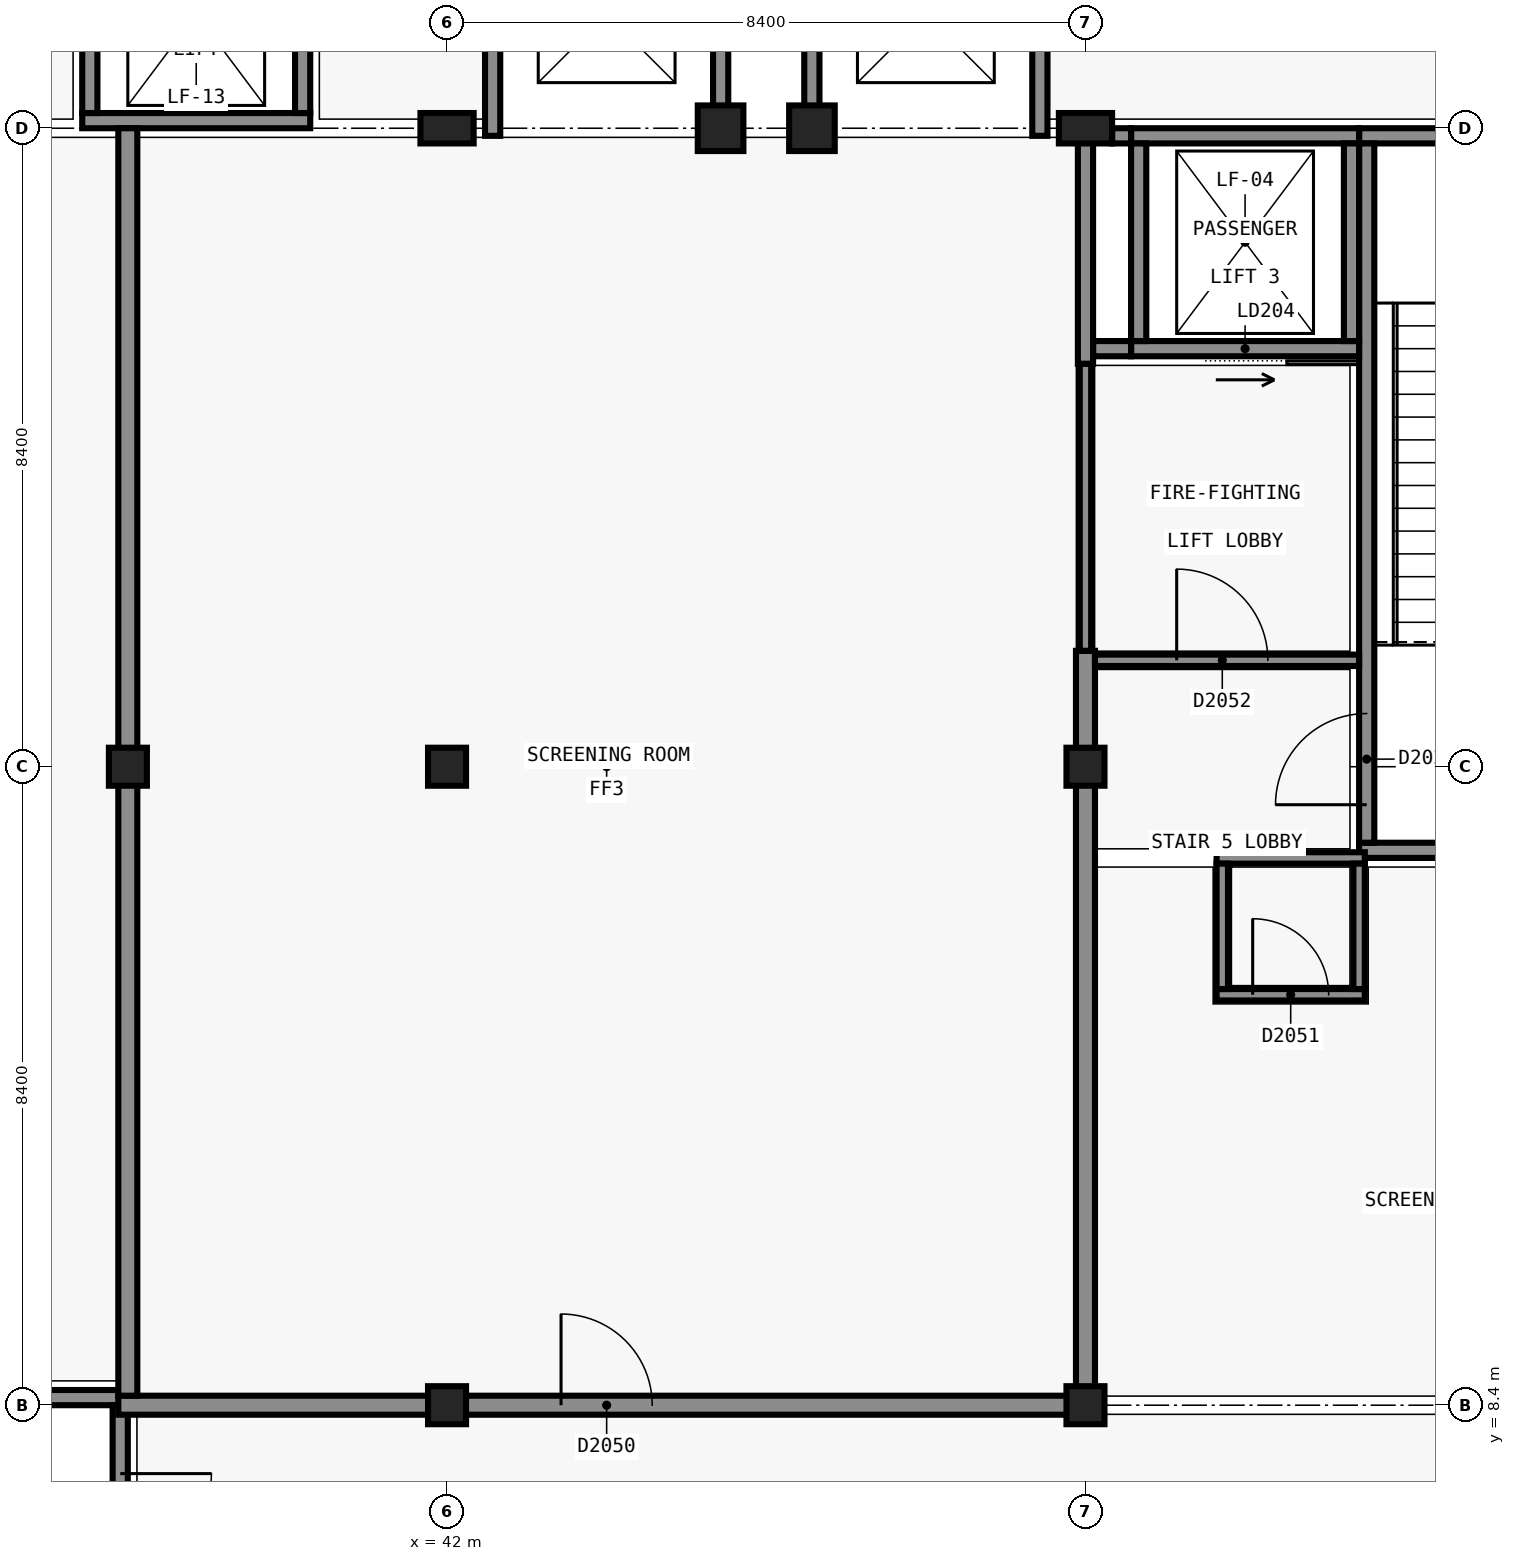
"""IFC4 building model, lengths in metres.
Left out: names, types, materials, properties, quantities, classifications, styles, units other than length and angle.
Written with IfcOpenShell. Run it as: python <this file> out.ifc"""

import sys

from ifc_helpers import new_model, si_unit, direction, frame, frame_2d, origin, origin_2d, place, context, subcontext, project, spatial, rectangle, extrude, element, fill, save


model = new_model("IFC4")
c1 = context("Model", 3, precision=1e-05, world=origin(), true_north=direction((0.0, 1.0)))
c2 = subcontext(c1, "Body", "Model", "MODEL_VIEW")
j1 = project(units=[si_unit("LENGTHUNIT", "METRE"), si_unit("PLANEANGLEUNIT", "RADIAN")], contexts=[c1])
p1 = place(None, origin())
s1 = spatial("IfcSite", under=j1, at=p1, CompositionType="ELEMENT")
p2 = place(p1, origin())
s2 = spatial("IfcBuilding", under=s1, at=p2, CompositionType="ELEMENT")
p3 = place(p2, frame((0.0, 0.0, 10.2)))
s3 = spatial("IfcBuildingStorey", under=s2, at=p3, CompositionType="ELEMENT", Elevation=10.2)
p4 = place(p3, frame((33.9, 8.5, 0.0), z_axis=(0.0, 0.0, 1.0), x_axis=(1.0, 0.0, 0.0)))
e1 = element("IfcWall", 1, at=p4, inside=s3, PredefinedType="SHEAR", context=c2, shape_type="SweptSolid", body=[
    extrude(rectangle(XDim=3.9, YDim=0.2, at=frame_2d((1.95, 0.0))), origin(), (0.0, 0.0, 1.0), 4.8),
])
p5 = place(p4, frame((1.2, 0.0, 0.0)))
e2 = element("IfcOpeningElement", 2, at=p5, cuts=e1, PredefinedType="OPENING", context=c2, shape_type="SweptSolid", body=[
    extrude(rectangle(XDim=1.2, YDim=2.1, at=frame_2d((0.6, 1.05))), frame((0.0, 0.11, 0.0), z_axis=(0.0, -1.0, 0.0), x_axis=(1.0, 0.0, 0.0)), (0.0, 0.0, 1.0), 0.22),
])
p6 = place(p3, frame((37.7, 8.4, 0.0), z_axis=(0.0, 0.0, 1.0), x_axis=(0.0, -1.0, 0.0)))
e3 = element("IfcWall", 3, at=p6, inside=s3, PredefinedType="SHEAR", context=c2, shape_type="SweptSolid", body=[
    extrude(rectangle(XDim=8.2, YDim=0.2, at=frame_2d((4.1, 0.0))), origin(), (0.0, 0.0, 1.0), 4.8),
])
p7 = place(p6, frame((0.9, 0.0, 0.0)))
e4 = element("IfcOpeningElement", 4, at=p7, cuts=e3, PredefinedType="OPENING", context=c2, shape_type="SweptSolid", body=[
    extrude(rectangle(XDim=1.2, YDim=2.1, at=frame_2d((0.6, 1.05))), frame((0.0, 0.11, 0.0), z_axis=(0.0, -1.0, 0.0), x_axis=(1.0, 0.0, 0.0)), (0.0, 0.0, 1.0), 0.22),
])
p8 = place(p3, frame((58.8, 15.7, 0.0), z_axis=(0.0, 0.0, 1.0), x_axis=(-1.0, 0.0, 0.0)))
e5 = element("IfcWall", 5, at=p8, inside=s3, PredefinedType="SHEAR", context=c2, shape_type="SweptSolid", body=[
    extrude(rectangle(XDim=4.8, YDim=0.2, at=frame_2d((2.4, 0.0))), origin(), (0.0, 0.0, 1.0), 4.8),
])
p9 = place(p8, frame((1.9, 0.0, 0.0)))
e6 = element("IfcOpeningElement", 6, at=p9, cuts=e5, PredefinedType="OPENING", context=c2, shape_type="SweptSolid", body=[
    extrude(rectangle(XDim=1.2, YDim=2.1, at=frame_2d((0.6, 1.05))), frame((0.0, 0.11, 0.0), z_axis=(0.0, -1.0, 0.0), x_axis=(1.0, 0.0, 0.0)), (0.0, 0.0, 1.0), 0.22),
])
p10 = place(p3, frame((54.0, 25.1, 0.0), z_axis=(0.0, 0.0, 1.0), x_axis=(1.0, 0.0, 0.0)))
e7 = element("IfcWall", 7, at=p10, inside=s3, PredefinedType="SHEAR", context=c2, shape_type="SweptSolid", body=[
    extrude(rectangle(XDim=4.8, YDim=0.2, at=frame_2d((2.4, 0.0))), origin(), (0.0, 0.0, 1.0), 4.8),
])
p11 = place(p3, frame((54.1, 15.8, 0.0), z_axis=(0.0, 0.0, 1.0), x_axis=(0.0, 1.0, 0.0)))
e8 = element("IfcWall", 8, at=p11, inside=s3, PredefinedType="SHEAR", context=c2, shape_type="SweptSolid", body=[
    extrude(rectangle(XDim=9.2, YDim=0.2, at=frame_2d((4.6, 0.0))), origin(), (0.0, 0.0, 1.0), 4.8),
])
p12 = place(p11, frame((0.5, 0.0, 0.0)))
e9 = element("IfcOpeningElement", 9, at=p12, cuts=e8, PredefinedType="OPENING", context=c2, shape_type="SweptSolid", body=[
    extrude(rectangle(XDim=1.2, YDim=2.1, at=frame_2d((0.6, 1.05))), frame((0.0, 0.11, 0.0), z_axis=(0.0, -1.0, 0.0), x_axis=(1.0, 0.0, 0.0)), (0.0, 0.0, 1.0), 0.22),
])
p13 = place(p3, frame((54.0, 22.3, 0.0), z_axis=(0.0, 0.0, 1.0), x_axis=(-1.0, 0.0, 0.0)))
e10 = element("IfcWall", 10, at=p13, inside=s3, PredefinedType="SHEAR", context=c2, shape_type="SweptSolid", body=[
    extrude(rectangle(XDim=3.0, YDim=0.2, at=frame_2d((1.5, 0.0))), origin(), (0.0, 0.0, 1.0), 4.8),
])
p14 = place(p13, frame((0.95, 0.0, 0.0)))
e11 = element("IfcOpeningElement", 11, at=p14, cuts=e10, PredefinedType="OPENING", context=c2, shape_type="SweptSolid", body=[
    extrude(rectangle(XDim=1.1, YDim=2.1, at=frame_2d((0.55, 1.05))), frame((0.0, 0.11, 0.0), z_axis=(0.0, -1.0, 0.0), x_axis=(1.0, 0.0, 0.0)), (0.0, 0.0, 1.0), 0.22),
])
p15 = place(p3, frame((51.0, 25.1, 0.0), z_axis=(0.0, 0.0, 1.0), x_axis=(1.0, 0.0, 0.0)))
e12 = element("IfcWall", 12, at=p15, inside=s3, PredefinedType="SHEAR", context=c2, shape_type="SweptSolid", body=[
    extrude(rectangle(XDim=3.0, YDim=0.2, at=frame_2d((1.5, 0.0))), origin(), (0.0, 0.0, 1.0), 4.8),
])
for number, where, z_axis, x_axis in (
    (13, (51.1, 22.4, 0.0), (0.0, 0.0, 1.0), (0.0, 1.0, 0.0)),
    (14, (53.9, 25.0, 0.0), (0.0, 0.0, 1.0), (0.0, -1.0, 0.0)),
):
    element("IfcWall", number, at=place(p3, frame(where, z_axis=z_axis, x_axis=x_axis)), inside=s3, PredefinedType="SHEAR", context=c2, shape_type="SweptSolid", body=[
        extrude(rectangle(XDim=2.6, YDim=0.2, at=frame_2d((1.3, 0.0))), origin(), (0.0, 0.0, 1.0), 4.8),
    ])
p16 = place(p3, frame((40.2, 25.3, 0.0), z_axis=(0.0, 0.0, 1.0), x_axis=(-1.0, 0.0, 0.0)))
e15 = element("IfcWall", 15, at=p16, inside=s3, PredefinedType="SHEAR", context=c2, shape_type="SweptSolid", body=[
    extrude(rectangle(XDim=3.0, YDim=0.2, at=frame_2d((1.5, 0.0))), origin(), (0.0, 0.0, 1.0), 4.8),
])
for number, where, z_axis, x_axis in (
    (16, (37.3, 25.4, 0.0), (0.0, 0.0, 1.0), (0.0, 1.0, 0.0)),
    (17, (40.1, 28.0, 0.0), (0.0, 0.0, 1.0), (0.0, -1.0, 0.0)),
):
    element("IfcWall", number, at=place(p3, frame(where, z_axis=z_axis, x_axis=x_axis)), inside=s3, PredefinedType="SHEAR", context=c2, shape_type="SweptSolid", body=[
        extrude(rectangle(XDim=2.6, YDim=0.2, at=frame_2d((1.3, 0.0))), origin(), (0.0, 0.0, 1.0), 4.8),
    ])
for number, where, z_axis, x_axis in (
    (18, (42.0, 8.4, 0.0), (0.0, 0.0, 1.0), (1.0, 0.0, 0.0)),
    (19, (42.0, 16.8, 0.0), (0.0, 0.0, 1.0), (1.0, 0.0, 0.0)),
):
    element("IfcColumn", number, at=place(p3, frame(where, z_axis=z_axis, x_axis=x_axis)), inside=s3, PredefinedType="COLUMN", context=c2, shape_type="SweptSolid", body=[
        extrude(rectangle(XDim=0.5, YDim=0.5, at=origin_2d()), origin(), (0.0, 0.0, 1.0), 4.8),
    ])
p17 = place(p3, frame((42.0, 25.2, 0.0), z_axis=(0.0, 0.0, 1.0), x_axis=(1.0, 0.0, 0.0)))
e20 = element("IfcColumn", 20, at=p17, inside=s3, PredefinedType="COLUMN", context=c2, shape_type="SweptSolid", body=[
    extrude(rectangle(XDim=0.7, YDim=0.4, at=origin_2d()), origin(), (0.0, 0.0, 1.0), 4.8),
])
for number, where, z_axis, x_axis in (
    (21, (50.4, 8.4, 0.0), (0.0, 0.0, 1.0), (1.0, 0.0, 0.0)),
    (22, (50.4, 16.8, 0.0), (0.0, 0.0, 1.0), (1.0, 0.0, 0.0)),
):
    element("IfcColumn", number, at=place(p3, frame(where, z_axis=z_axis, x_axis=x_axis)), inside=s3, PredefinedType="COLUMN", context=c2, shape_type="SweptSolid", body=[
        extrude(rectangle(XDim=0.5, YDim=0.5, at=origin_2d()), origin(), (0.0, 0.0, 1.0), 4.8),
    ])
p18 = place(p3, frame((50.4, 25.2, 0.0), z_axis=(0.0, 0.0, 1.0), x_axis=(1.0, 0.0, 0.0)))
e23 = element("IfcColumn", 23, at=p18, inside=s3, PredefinedType="COLUMN", context=c2, shape_type="SweptSolid", body=[
    extrude(rectangle(XDim=0.7, YDim=0.4, at=origin_2d()), origin(), (0.0, 0.0, 1.0), 4.8),
])
p19 = place(p3, frame((51.0, 22.3, 0.0), z_axis=(0.0, 0.0, 1.0), x_axis=(-1.0, 0.0, 0.0)))
e24 = element("IfcWall", 24, at=p19, inside=s3, PredefinedType="SHEAR", context=c2, shape_type="SweptSolid", body=[
    extrude(rectangle(XDim=0.5, YDim=0.2, at=frame_2d((0.25, 0.0))), origin(), (0.0, 0.0, 1.0), 4.8),
])
p20 = place(p3, frame((50.75, 25.1, 0.0), z_axis=(0.0, 0.0, 1.0), x_axis=(1.0, 0.0, 0.0)))
e25 = element("IfcWall", 25, at=p20, inside=s3, PredefinedType="SHEAR", context=c2, shape_type="SweptSolid", body=[
    extrude(rectangle(XDim=0.25, YDim=0.2, at=frame_2d((0.125, 0.0))), origin(), (0.0, 0.0, 1.0), 4.8),
])
for number, where, z_axis, x_axis in (
    (26, (45.599, 25.2, 0.0), (0.0, 0.0, 1.0), (1.0, 0.0, 0.0)),
    (27, (46.801, 25.2, 0.0), (0.0, 0.0, 1.0), (1.0, 0.0, 0.0)),
):
    element("IfcColumn", number, at=place(p3, frame(where, z_axis=z_axis, x_axis=x_axis)), inside=s3, PredefinedType="COLUMN", context=c2, shape_type="SweptSolid", body=[
        extrude(rectangle(XDim=0.6, YDim=0.6, at=origin_2d()), origin(), (0.0, 0.0, 1.0), 4.8),
    ])
p21 = place(p3, frame((37.801, 16.8, 0.0), z_axis=(0.0, 0.0, 1.0), x_axis=(1.0, 0.0, 0.0)))
e28 = element("IfcColumn", 28, at=p21, inside=s3, PredefinedType="COLUMN", context=c2, shape_type="SweptSolid", body=[
    extrude(rectangle(XDim=0.5, YDim=0.5, at=origin_2d()), origin(), (0.0, 0.0, 1.0), 4.8),
])
p22 = place(p3, frame((37.675, 8.4, 0.0), z_axis=(0.0, 0.0, 1.0), x_axis=(1.0, 0.0, 0.0)))
e29 = element("IfcWall", 29, at=p22, inside=s3, PredefinedType="PARTITIONING", context=c2, shape_type="SweptSolid", body=[
    extrude(rectangle(XDim=12.85, YDim=0.25, at=frame_2d((6.425, 0.0))), origin(), (0.0, 0.0, 1.0), 3.8),
])
p23 = place(p22, frame((5.825, 0.0, 0.0)))
e30 = element("IfcOpeningElement", 30, at=p23, cuts=e29, PredefinedType="OPENING", context=c2, shape_type="SweptSolid", body=[
    extrude(rectangle(XDim=1.2, YDim=2.1, at=frame_2d((0.6, 1.05))), frame((0.0, 0.135, 0.0), z_axis=(0.0, -1.0, 0.0), x_axis=(1.0, 0.0, 0.0)), (0.0, 0.0, 1.0), 0.27),
])
p24 = place(p3, frame((37.8, 8.525, 0.0), z_axis=(0.0, 0.0, 1.0), x_axis=(0.0, 1.0, 0.0)))
e31 = element("IfcWall", 31, at=p24, inside=s3, PredefinedType="PARTITIONING", context=c2, shape_type="SweptSolid", body=[
    extrude(rectangle(XDim=16.675, YDim=0.25, at=frame_2d((8.337, 0.0))), origin(), (0.0, 0.0, 1.0), 3.8),
])
p25 = place(p3, frame((50.4, 8.525, 0.0), z_axis=(0.0, 0.0, 1.0), x_axis=(0.0, 1.0, 0.0)))
e32 = element("IfcWall", 32, at=p25, inside=s3, PredefinedType="PARTITIONING", context=c2, shape_type="SweptSolid", body=[
    extrude(rectangle(XDim=9.8, YDim=0.25, at=frame_2d((4.9, 0.0))), origin(), (0.0, 0.0, 1.0), 3.8),
])
for number, where, z_axis, x_axis in (
    (33, (42.6, 25.1, 0.0), (0.0, 0.0, 1.0), (0.0, 1.0, 0.0)),
    (34, (45.6, 25.1, 0.0), (0.0, 0.0, 1.0), (0.0, 1.0, 0.0)),
    (35, (46.8, 25.1, 0.0), (0.0, 0.0, 1.0), (0.0, 1.0, 0.0)),
    (36, (49.8, 25.1, 0.0), (0.0, 0.0, 1.0), (0.0, 1.0, 0.0)),
):
    element("IfcWall", number, at=place(p3, frame(where, z_axis=z_axis, x_axis=x_axis)), inside=s3, PredefinedType="SHEAR", context=c2, shape_type="SweptSolid", body=[
        extrude(rectangle(XDim=3.0, YDim=0.2, at=frame_2d((1.5, 0.0))), origin(), (0.0, 0.0, 1.0), 4.5),
    ])
p26 = place(p3, frame((50.4, 22.1, 0.0), z_axis=(0.0, 0.0, 1.0), x_axis=(0.0, 1.0, 0.0)))
e37 = element("IfcWall", 37, at=p26, inside=s3, PredefinedType="SHEAR", context=c2, shape_type="SweptSolid", body=[
    extrude(rectangle(XDim=3.2, YDim=0.2, at=frame_2d((1.6, 0.0))), origin(), (0.0, 0.0, 1.0), 4.5),
])
p27 = place(p3, frame((52.125, 13.8, 0.0), z_axis=(0.0, 0.0, 1.0), x_axis=(1.0, 0.0, 0.0)))
e38 = element("IfcWall", 38, at=p27, inside=s3, PredefinedType="PARTITIONING", context=c2, shape_type="SweptSolid", body=[
    extrude(rectangle(XDim=1.95, YDim=0.15, at=frame_2d((0.975, 0.0))), origin(), (0.0, 0.0, 1.0), 4.5),
])
p28 = place(p27, frame((0.475, 0.0, 0.0)))
e39 = element("IfcOpeningElement", 39, at=p28, cuts=e38, PredefinedType="OPENING", context=c2, shape_type="SweptSolid", body=[
    extrude(rectangle(XDim=1.0, YDim=2.1, at=frame_2d((0.5, 1.05))), frame((0.0, 0.085, 0.0), z_axis=(0.0, -1.0, 0.0), x_axis=(1.0, 0.0, 0.0)), (0.0, 0.0, 1.0), 0.17),
])
p29 = place(p3, frame((52.125, 15.6, 0.0), z_axis=(0.0, 0.0, 1.0), x_axis=(1.0, 0.0, 0.0)))
e40 = element("IfcWall", 40, at=p29, inside=s3, PredefinedType="PARTITIONING", context=c2, shape_type="SweptSolid", body=[
    extrude(rectangle(XDim=1.95, YDim=0.15, at=frame_2d((0.975, 0.0))), origin(), (0.0, 0.0, 1.0), 4.5),
])
p30 = place(p3, frame((50.525, 18.2, 0.0), z_axis=(0.0, 0.0, 1.0), x_axis=(1.0, 0.0, 0.0)))
e41 = element("IfcWall", 41, at=p30, inside=s3, PredefinedType="SOLIDWALL", context=c2, shape_type="SweptSolid", body=[
    extrude(rectangle(XDim=3.475, YDim=0.15, at=frame_2d((1.738, 0.0))), origin(), (0.0, 0.0, 1.0), 3.8),
])
p31 = place(p30, frame((1.075, 0.0, 0.0)))
e42 = element("IfcOpeningElement", 42, at=p31, cuts=e41, PredefinedType="OPENING", context=c2, shape_type="SweptSolid", body=[
    extrude(rectangle(XDim=1.2, YDim=2.1, at=frame_2d((0.6, 1.05))), frame((0.0, 0.085, 0.0), z_axis=(0.0, -1.0, 0.0), x_axis=(1.0, 0.0, 0.0)), (0.0, 0.0, 1.0), 0.17),
])
for number, where, z_axis, x_axis in (
    (43, (52.2, 13.875, 0.0), (0.0, 0.0, 1.0), (0.0, 1.0, 0.0)),
    (44, (54.0, 13.875, 0.0), (0.0, 0.0, 1.0), (0.0, 1.0, 0.0)),
):
    element("IfcWall", number, at=place(p3, frame(where, z_axis=z_axis, x_axis=x_axis)), inside=s3, PredefinedType="PARTITIONING", context=c2, shape_type="SweptSolid", body=[
        extrude(rectangle(XDim=1.65, YDim=0.15, at=frame_2d((0.825, 0.0))), origin(), (0.0, 0.0, 1.0), 4.5),
    ])
p32 = place(p3, frame((50.4, 18.325, 0.0), z_axis=(0.0, 0.0, 1.0), x_axis=(0.0, 1.0, 0.0)))
e45 = element("IfcWall", 45, at=p32, inside=s3, PredefinedType="SOLIDWALL", context=c2, shape_type="SweptSolid", body=[
    extrude(rectangle(XDim=3.775, YDim=0.15, at=frame_2d((1.888, 0.0))), origin(), (0.0, 0.0, 1.0), 3.8),
])
p33 = place(p14, origin())
e46 = element("IfcDoor", 46, at=p33, inside=s3, OperationType="SLIDING_TO_LEFT", PredefinedType="DOOR", context=c2, shape_type="SweptSolid", body=[
    extrude(rectangle(XDim=1.1, YDim=2.1, at=frame_2d((0.55, 1.05))), frame((0.0, 0.025, 0.0), z_axis=(0.0, -1.0, 0.0), x_axis=(1.0, 0.0, 0.0)), (0.0, 0.0, 1.0), 0.05),
])
fill(e11, e46)
p34 = place(p7, origin())
e47 = element("IfcDoor", 47, at=p34, inside=s3, OperationType="SINGLE_SWING_RIGHT", PredefinedType="DOOR", context=c2, shape_type="SweptSolid", body=[
    extrude(rectangle(XDim=1.2, YDim=2.1, at=frame_2d((0.6, 1.05))), frame((0.0, 0.025, 0.0), z_axis=(0.0, -1.0, 0.0), x_axis=(1.0, 0.0, 0.0)), (0.0, 0.0, 1.0), 0.05),
])
fill(e4, e47)
p35 = place(p12, origin())
e48 = element("IfcDoor", 48, at=p35, inside=s3, OperationType="SINGLE_SWING_LEFT", PredefinedType="DOOR", context=c2, shape_type="SweptSolid", body=[
    extrude(rectangle(XDim=1.2, YDim=2.1, at=frame_2d((0.6, 1.05))), frame((0.0, 0.025, 0.0), z_axis=(0.0, -1.0, 0.0), x_axis=(1.0, 0.0, 0.0)), (0.0, 0.0, 1.0), 0.05),
])
fill(e9, e48)
p36 = place(p23, origin())
e49 = element("IfcDoor", 49, at=p36, inside=s3, OperationType="SINGLE_SWING_LEFT", PredefinedType="DOOR", context=c2, shape_type="SweptSolid", body=[
    extrude(rectangle(XDim=1.2, YDim=2.1, at=frame_2d((0.6, 1.05))), frame((0.0, 0.025, 0.0), z_axis=(0.0, -1.0, 0.0), x_axis=(1.0, 0.0, 0.0)), (0.0, 0.0, 1.0), 0.05),
])
fill(e30, e49)
p37 = place(p28, origin())
e50 = element("IfcDoor", 50, at=p37, inside=s3, OperationType="SINGLE_SWING_RIGHT", PredefinedType="DOOR", context=c2, shape_type="SweptSolid", body=[
    extrude(rectangle(XDim=1.0, YDim=2.1, at=frame_2d((0.5, 1.05))), frame((0.0, 0.025, 0.0), z_axis=(0.0, -1.0, 0.0), x_axis=(1.0, 0.0, 0.0)), (0.0, 0.0, 1.0), 0.05),
])
fill(e39, e50)
p38 = place(p31, origin())
e51 = element("IfcDoor", 51, at=p38, inside=s3, OperationType="SINGLE_SWING_RIGHT", PredefinedType="DOOR", context=c2, shape_type="SweptSolid", body=[
    extrude(rectangle(XDim=1.2, YDim=2.1, at=frame_2d((0.6, 1.05))), frame((0.0, 0.025, 0.0), z_axis=(0.0, -1.0, 0.0), x_axis=(1.0, 0.0, 0.0)), (0.0, 0.0, 1.0), 0.05),
])
fill(e42, e51)
save(model, sys.argv[1])
